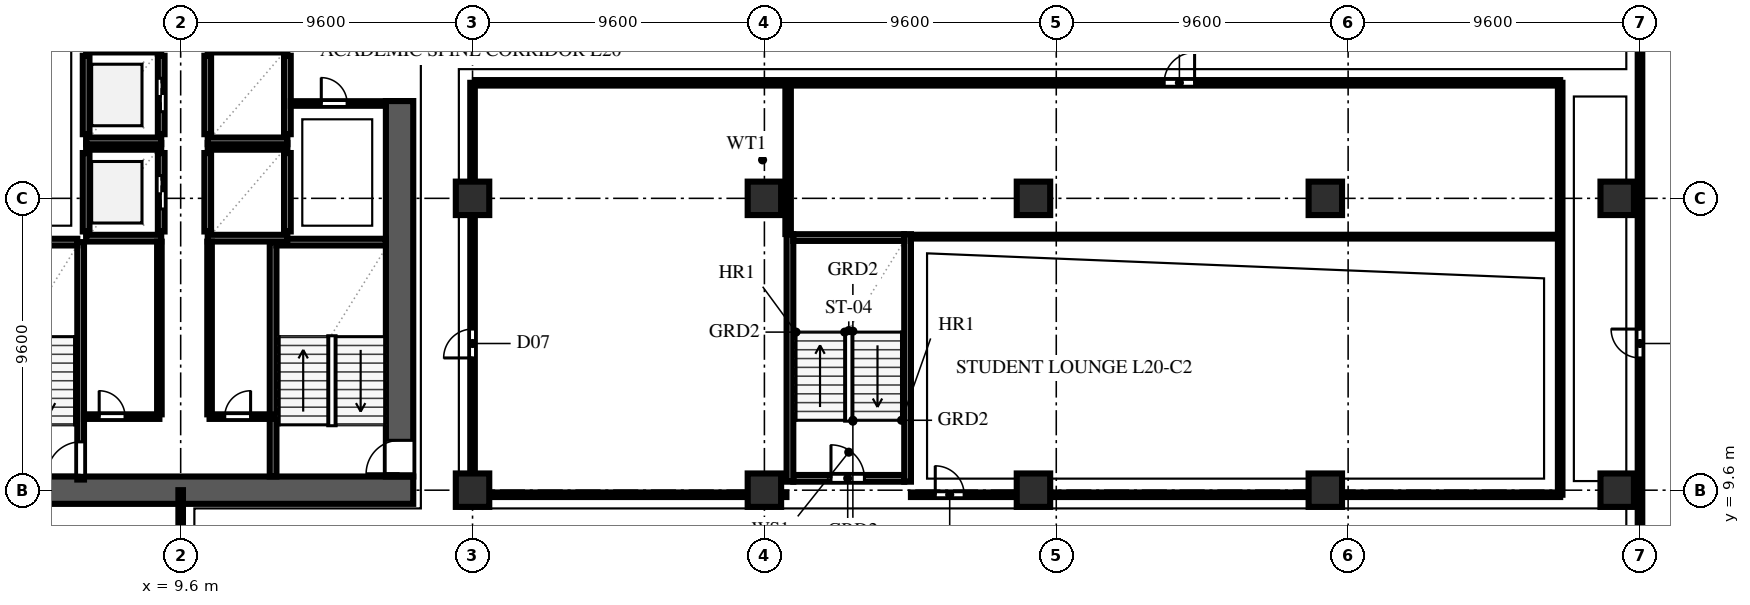
"""IFC4 building model, lengths in metres.
Left out: names, types, materials, properties, quantities, classifications, styles, units other than length and angle.
Written with IfcOpenShell. Run it as: python <this file> out.ifc"""

import sys

from ifc_helpers import new_model, si_unit, direction, frame, frame_2d, origin, origin_2d, place, context, subcontext, project, spatial, rectangle, extrude, element, fill, save


model = new_model("IFC4")
c1 = context("Model", 3, precision=1e-05, world=origin(), true_north=direction((0.0, 1.0)))
c2 = subcontext(c1, "Body", "Model", "MODEL_VIEW")
j1 = project(units=[si_unit("LENGTHUNIT", "METRE"), si_unit("PLANEANGLEUNIT", "RADIAN")], contexts=[c1])
p1 = place(None, origin())
s1 = spatial("IfcSite", under=j1, at=p1, CompositionType="ELEMENT")
p2 = place(p1, origin())
s2 = spatial("IfcBuilding", under=s1, at=p2, CompositionType="ELEMENT")
p3 = place(p2, frame((0.0, 0.0, 81.2)))
s3 = spatial("IfcBuildingStorey", under=s2, at=p3, CompositionType="ELEMENT", Elevation=81.2)
p4 = place(p3, frame((2.65, 9.6, 0.0), z_axis=(0.0, 0.0, 1.0), x_axis=(1.0, 0.0, 0.0)))
e1 = element("IfcWall", 1, at=p4, inside=s3, PredefinedType="SHEAR", context=c2, shape_type="SweptSolid", body=[
    extrude(rectangle(XDim=14.6, YDim=0.9, at=frame_2d((7.3, 0.0))), origin(), (0.0, 0.0, 1.0), 3.54),
])
p5 = place(p3, frame((16.8, 10.05, 0.0), z_axis=(0.0, 0.0, 1.0), x_axis=(0.0, 1.0, 0.0)))
e2 = element("IfcWall", 2, at=p5, inside=s3, PredefinedType="SHEAR", context=c2, shape_type="SweptSolid", body=[
    extrude(rectangle(XDim=12.35, YDim=0.9, at=frame_2d((6.175, 0.0))), origin(), (0.0, 0.0, 1.0), 3.54),
])
p6 = place(p5, frame((0.09, 0.0, 0.0)))
e3 = element("IfcOpeningElement", 3, at=p6, cuts=e2, PredefinedType="OPENING", context=c2, shape_type="SweptSolid", body=[
    extrude(rectangle(XDim=1.1, YDim=2.2, at=frame_2d((0.55, 1.1))), frame((0.0, 0.462, 0.0), z_axis=(0.0, -1.0, 0.0), x_axis=(1.0, 0.0, 0.0)), (0.0, 0.0, 1.0), 0.924),
])
for number, where, z_axis, x_axis in (
    (4, (19.2, 9.6, 0.0), (0.0, 0.0, 1.0), (1.0, 0.0, 0.0)),
    (5, (19.2, 19.2, 0.0), (0.0, 0.0, 1.0), (1.0, 0.0, 0.0)),
    (6, (28.8, 9.6, 0.0), (0.0, 0.0, 1.0), (1.0, 0.0, 0.0)),
    (7, (28.8, 19.2, 0.0), (0.0, 0.0, 1.0), (1.0, 0.0, 0.0)),
    (8, (37.65, 9.6, 0.0), (0.0, 0.0, 1.0), (1.0, 0.0, 0.0)),
    (9, (37.65, 19.2, 0.0), (0.0, 0.0, 1.0), (1.0, 0.0, 0.0)),
    (10, (47.25, 9.6, 0.0), (0.0, 0.0, 1.0), (1.0, 0.0, 0.0)),
    (11, (47.25, 19.2, 0.0), (0.0, 0.0, 1.0), (1.0, 0.0, 0.0)),
    (12, (56.85, 9.6, 0.0), (0.0, 0.0, 1.0), (1.0, 0.0, 0.0)),
    (13, (56.85, 19.2, 0.0), (0.0, 0.0, 1.0), (1.0, 0.0, 0.0)),
):
    element("IfcColumn", number, at=place(p3, frame(where, z_axis=z_axis, x_axis=x_axis)), inside=s3, PredefinedType="COLUMN", context=c2, shape_type="SweptSolid", body=[
        extrude(rectangle(XDim=1.1, YDim=1.1, at=origin_2d()), origin(), (0.0, 0.0, 1.0), 3.8),
    ])
p7 = place(p3, frame((6.31, 9.95, 0.0), z_axis=(0.0, 0.0, 1.0), x_axis=(0.0, 1.0, 0.0)))
e14 = element("IfcWall", 14, at=p7, inside=s3, PredefinedType="SOLIDWALL", context=c2, shape_type="SweptSolid", body=[
    extrude(rectangle(XDim=7.81, YDim=0.22, at=frame_2d((3.905, 0.0))), origin(), (0.0, 0.0, 1.0), 3.54),
])
p8 = place(p7, frame((0.14, 0.0, 0.0)))
e15 = element("IfcOpeningElement", 15, at=p8, cuts=e14, PredefinedType="OPENING", context=c2, shape_type="SweptSolid", body=[
    extrude(rectangle(XDim=1.1, YDim=2.2, at=frame_2d((0.55, 1.1))), frame((0.0, 0.122, 0.0), z_axis=(0.0, -1.0, 0.0), x_axis=(1.0, 0.0, 0.0)), (0.0, 0.0, 1.0), 0.244),
])
p9 = place(p3, frame((2.65, 17.76, 0.0), z_axis=(0.0, 0.0, 1.0), x_axis=(1.0, 0.0, 0.0)))
e16 = element("IfcWall", 16, at=p9, inside=s3, PredefinedType="SOLIDWALL", context=c2, shape_type="SweptSolid", body=[
    extrude(rectangle(XDim=3.55, YDim=0.22, at=frame_2d((1.775, 0.0))), origin(), (0.0, 0.0, 1.0), 3.54),
])
p10 = place(p3, frame((12.64, 10.05, 0.0), z_axis=(0.0, 0.0, 1.0), x_axis=(0.0, 1.0, 0.0)))
e17 = element("IfcWall", 17, at=p10, inside=s3, PredefinedType="SOLIDWALL", context=c2, shape_type="SweptSolid", body=[
    extrude(rectangle(XDim=7.71, YDim=0.22, at=frame_2d((3.855, 0.0))), origin(), (0.0, 0.0, 1.0), 3.54),
])
p11 = place(p3, frame((12.75, 17.76, 0.0), z_axis=(0.0, 0.0, 1.0), x_axis=(1.0, 0.0, 0.0)))
e18 = element("IfcWall", 18, at=p11, inside=s3, PredefinedType="SOLIDWALL", context=c2, shape_type="SweptSolid", body=[
    extrude(rectangle(XDim=3.6, YDim=0.22, at=frame_2d((1.8, 0.0))), origin(), (0.0, 0.0, 1.0), 3.54),
])
p12 = place(p3, frame((29.75, 9.99, 0.0), z_axis=(0.0, 0.0, 1.0), x_axis=(1.0, 0.0, 0.0)))
e19 = element("IfcWall", 19, at=p12, inside=s3, PredefinedType="SOLIDWALL", context=c2, shape_type="SweptSolid", body=[
    extrude(rectangle(XDim=3.65, YDim=0.22, at=frame_2d((1.825, 0.0))), origin(), (0.0, 0.0, 1.0), 3.54),
])
p13 = place(p12, frame((1.24, 0.0, 0.0)))
e20 = element("IfcOpeningElement", 20, at=p13, cuts=e19, PredefinedType="OPENING", context=c2, shape_type="SweptSolid", body=[
    extrude(rectangle(XDim=1.1, YDim=2.2, at=frame_2d((0.55, 1.1))), frame((0.0, 0.122, 0.0), z_axis=(0.0, -1.0, 0.0), x_axis=(1.0, 0.0, 0.0)), (0.0, 0.0, 1.0), 0.244),
])
for number, where, z_axis, x_axis in (
    (21, (29.64, 9.88, 0.0), (0.0, 0.0, 1.0), (0.0, 1.0, 0.0)),
    (22, (33.51, 9.88, 0.0), (0.0, 0.0, 1.0), (0.0, 1.0, 0.0)),
):
    element("IfcWall", number, at=place(p3, frame(where, z_axis=z_axis, x_axis=x_axis)), inside=s3, PredefinedType="SOLIDWALL", context=c2, shape_type="SweptSolid", body=[
        extrude(rectangle(XDim=8.14, YDim=0.22, at=frame_2d((4.07, 0.0))), origin(), (0.0, 0.0, 1.0), 3.54),
    ])
p14 = place(p3, frame((29.75, 17.91, 0.0), z_axis=(0.0, 0.0, 1.0), x_axis=(1.0, 0.0, 0.0)))
e23 = element("IfcWall", 23, at=p14, inside=s3, PredefinedType="SOLIDWALL", context=c2, shape_type="SweptSolid", body=[
    extrude(rectangle(XDim=3.65, YDim=0.22, at=frame_2d((1.825, 0.0))), origin(), (0.0, 0.0, 1.0), 3.54),
])
p15 = place(p3, frame((6.49, 18.11, 0.0), z_axis=(0.0, 0.0, 1.0), x_axis=(0.0, 1.0, 0.0)))
e24 = element("IfcWall", 24, at=p15, inside=s3, PredefinedType="SOLIDWALL", context=c2, shape_type="SweptSolid", body=[
    extrude(rectangle(XDim=2.58, YDim=0.22, at=frame_2d((1.29, 0.0))), origin(), (0.0, 0.0, 1.0), 3.54),
])
p16 = place(p3, frame((8.96, 18.11, 0.0), z_axis=(0.0, 0.0, 1.0), x_axis=(0.0, 1.0, 0.0)))
e25 = element("IfcWall", 25, at=p16, inside=s3, PredefinedType="SOLIDWALL", context=c2, shape_type="SweptSolid", body=[
    extrude(rectangle(XDim=2.58, YDim=0.22, at=frame_2d((1.29, 0.0))), origin(), (0.0, 0.0, 1.0), 3.54),
])
p17 = place(p16, frame((0.74, 0.0, 0.0)))
e26 = element("IfcOpeningElement", 26, at=p17, cuts=e25, PredefinedType="OPENING", context=c2, shape_type="SweptSolid", body=[
    extrude(rectangle(XDim=1.1, YDim=2.2, at=frame_2d((0.55, 1.1))), frame((0.0, 0.122, 0.0), z_axis=(0.0, -1.0, 0.0), x_axis=(1.0, 0.0, 0.0)), (0.0, 0.0, 1.0), 0.244),
])
for number, where, z_axis, x_axis in (
    (27, (6.49, 17.89, 0.0), (0.0, 0.0, 1.0), (1.0, 0.0, 0.0)),
    (28, (6.49, 20.91, 0.0), (0.0, 0.0, 1.0), (1.0, 0.0, 0.0)),
):
    element("IfcWall", number, at=place(p3, frame(where, z_axis=z_axis, x_axis=x_axis)), inside=s3, PredefinedType="SOLIDWALL", context=c2, shape_type="SweptSolid", body=[
        extrude(rectangle(XDim=2.47, YDim=0.22, at=frame_2d((1.235, 0.0))), origin(), (0.0, 0.0, 1.0), 3.54),
    ])
p18 = place(p3, frame((6.49, 21.31, 0.0), z_axis=(0.0, 0.0, 1.0), x_axis=(0.0, 1.0, 0.0)))
e29 = element("IfcWall", 29, at=p18, inside=s3, PredefinedType="SOLIDWALL", context=c2, shape_type="SweptSolid", body=[
    extrude(rectangle(XDim=2.58, YDim=0.22, at=frame_2d((1.29, 0.0))), origin(), (0.0, 0.0, 1.0), 3.54),
])
p19 = place(p3, frame((8.96, 21.31, 0.0), z_axis=(0.0, 0.0, 1.0), x_axis=(0.0, 1.0, 0.0)))
e30 = element("IfcWall", 30, at=p19, inside=s3, PredefinedType="SOLIDWALL", context=c2, shape_type="SweptSolid", body=[
    extrude(rectangle(XDim=2.58, YDim=0.22, at=frame_2d((1.29, 0.0))), origin(), (0.0, 0.0, 1.0), 3.54),
])
p20 = place(p19, frame((0.74, 0.0, 0.0)))
e31 = element("IfcOpeningElement", 31, at=p20, cuts=e30, PredefinedType="OPENING", context=c2, shape_type="SweptSolid", body=[
    extrude(rectangle(XDim=1.1, YDim=2.2, at=frame_2d((0.55, 1.1))), frame((0.0, 0.122, 0.0), z_axis=(0.0, -1.0, 0.0), x_axis=(1.0, 0.0, 0.0)), (0.0, 0.0, 1.0), 0.244),
])
p21 = place(p3, frame((6.49, 21.09, 0.0), z_axis=(0.0, 0.0, 1.0), x_axis=(1.0, 0.0, 0.0)))
e32 = element("IfcWall", 32, at=p21, inside=s3, PredefinedType="SOLIDWALL", context=c2, shape_type="SweptSolid", body=[
    extrude(rectangle(XDim=2.47, YDim=0.22, at=frame_2d((1.235, 0.0))), origin(), (0.0, 0.0, 1.0), 3.54),
])
for number, where, z_axis, x_axis in (
    (33, (10.49, 18.11, 0.0), (0.0, 0.0, 1.0), (0.0, 1.0, 0.0)),
    (34, (13.11, 18.11, 0.0), (0.0, 0.0, 1.0), (0.0, 1.0, 0.0)),
):
    element("IfcWall", number, at=place(p3, frame(where, z_axis=z_axis, x_axis=x_axis)), inside=s3, PredefinedType="SOLIDWALL", context=c2, shape_type="SweptSolid", body=[
        extrude(rectangle(XDim=2.58, YDim=0.22, at=frame_2d((1.29, 0.0))), origin(), (0.0, 0.0, 1.0), 3.54),
    ])
for number, where, z_axis, x_axis in (
    (35, (10.49, 17.89, 0.0), (0.0, 0.0, 1.0), (1.0, 0.0, 0.0)),
    (36, (10.49, 20.91, 0.0), (0.0, 0.0, 1.0), (1.0, 0.0, 0.0)),
):
    element("IfcWall", number, at=place(p3, frame(where, z_axis=z_axis, x_axis=x_axis)), inside=s3, PredefinedType="SOLIDWALL", context=c2, shape_type="SweptSolid", body=[
        extrude(rectangle(XDim=2.62, YDim=0.22, at=frame_2d((1.31, 0.0))), origin(), (0.0, 0.0, 1.0), 3.54),
    ])
for number, where, z_axis, x_axis in (
    (37, (10.49, 21.31, 0.0), (0.0, 0.0, 1.0), (0.0, 1.0, 0.0)),
    (38, (13.11, 21.31, 0.0), (0.0, 0.0, 1.0), (0.0, 1.0, 0.0)),
):
    element("IfcWall", number, at=place(p3, frame(where, z_axis=z_axis, x_axis=x_axis)), inside=s3, PredefinedType="SOLIDWALL", context=c2, shape_type="SweptSolid", body=[
        extrude(rectangle(XDim=2.58, YDim=0.22, at=frame_2d((1.29, 0.0))), origin(), (0.0, 0.0, 1.0), 3.54),
    ])
p22 = place(p3, frame((10.49, 21.09, 0.0), z_axis=(0.0, 0.0, 1.0), x_axis=(1.0, 0.0, 0.0)))
e39 = element("IfcWall", 39, at=p22, inside=s3, PredefinedType="SOLIDWALL", context=c2, shape_type="SweptSolid", body=[
    extrude(rectangle(XDim=2.62, YDim=0.22, at=frame_2d((1.31, 0.0))), origin(), (0.0, 0.0, 1.0), 3.54),
])
p23 = place(p3, frame((6.42, 12.02, 0.0), z_axis=(0.0, 0.0, 1.0), x_axis=(1.0, 0.0, 0.0)))
e40 = element("IfcWall", 40, at=p23, inside=s3, PredefinedType="PARTITIONING", context=c2, shape_type="SweptSolid", body=[
    extrude(rectangle(XDim=2.48, YDim=0.15, at=frame_2d((1.24, 0.0))), origin(), (0.0, 0.0, 1.0), 3.54),
])
p24 = place(p23, frame((0.5, 0.0, 0.0)))
e41 = element("IfcOpeningElement", 41, at=p24, cuts=e40, PredefinedType="OPENING", context=c2, shape_type="SweptSolid", body=[
    extrude(rectangle(XDim=0.85, YDim=2.1, at=frame_2d((0.425, 1.05))), frame((0.0, 0.087, 0.0), z_axis=(0.0, -1.0, 0.0), x_axis=(1.0, 0.0, 0.0)), (0.0, 0.0, 1.0), 0.174),
])
p25 = place(p3, frame((10.55, 12.02, 0.0), z_axis=(0.0, 0.0, 1.0), x_axis=(1.0, 0.0, 0.0)))
e42 = element("IfcWall", 42, at=p25, inside=s3, PredefinedType="PARTITIONING", context=c2, shape_type="SweptSolid", body=[
    extrude(rectangle(XDim=2.08, YDim=0.15, at=frame_2d((1.04, 0.0))), origin(), (0.0, 0.0, 1.0), 3.54),
])
p26 = place(p25, frame((0.5, 0.0, 0.0)))
e43 = element("IfcOpeningElement", 43, at=p26, cuts=e42, PredefinedType="OPENING", context=c2, shape_type="SweptSolid", body=[
    extrude(rectangle(XDim=0.85, YDim=2.1, at=frame_2d((0.425, 1.05))), frame((0.0, 0.087, 0.0), z_axis=(0.0, -1.0, 0.0), x_axis=(1.0, 0.0, 0.0)), (0.0, 0.0, 1.0), 0.174),
])
for number, where, z_axis, x_axis in (
    (44, (8.9, 12.095, 0.0), (0.0, 0.0, 1.0), (0.0, 1.0, 0.0)),
    (45, (10.55, 12.095, 0.0), (0.0, 0.0, 1.0), (0.0, 1.0, 0.0)),
):
    element("IfcWall", number, at=place(p3, frame(where, z_axis=z_axis, x_axis=x_axis)), inside=s3, PredefinedType="PARTITIONING", context=c2, shape_type="SweptSolid", body=[
        extrude(rectangle(XDim=5.68, YDim=0.15, at=frame_2d((2.84, 0.0))), origin(), (0.0, 0.0, 1.0), 3.54),
    ])
p27 = place(p3, frame((13.225, 22.32, 0.0), z_axis=(0.0, 0.0, 1.0), x_axis=(1.0, 0.0, 0.0)))
e46 = element("IfcWall", 46, at=p27, inside=s3, PredefinedType="PARTITIONING", context=c2, shape_type="SweptSolid", body=[
    extrude(rectangle(XDim=3.12, YDim=0.15, at=frame_2d((1.56, 0.0))), origin(), (0.0, 0.0, 1.0), 3.54),
])
p28 = place(p27, frame((1.0, 0.0, 0.0)))
e47 = element("IfcOpeningElement", 47, at=p28, cuts=e46, PredefinedType="OPENING", context=c2, shape_type="SweptSolid", body=[
    extrude(rectangle(XDim=0.85, YDim=2.1, at=frame_2d((0.425, 1.05))), frame((0.0, 0.087, 0.0), z_axis=(0.0, -1.0, 0.0), x_axis=(1.0, 0.0, 0.0)), (0.0, 0.0, 1.0), 0.174),
])
p29 = place(p3, frame((9.6, 7.4, 0.0), z_axis=(0.0, 0.0, 1.0), x_axis=(0.0, 1.0, 0.0)))
e48 = element("IfcWall", 48, at=p29, inside=s3, PredefinedType="PARTITIONING", context=c2, shape_type="SweptSolid", body=[
    extrude(rectangle(XDim=2.2, YDim=0.15, at=frame_2d((1.1, 0.0))), origin(), (0.0, 0.0, 1.0), 3.071),
])
p30 = place(p3, frame((57.6, 0.22, 0.0), z_axis=(0.0, 0.0, 1.0), x_axis=(0.0, 1.0, 0.0)))
e49 = element("IfcWall", 49, at=p30, inside=s3, PredefinedType="PARTITIONING", context=c2, shape_type="SweptSolid", body=[
    extrude(rectangle(XDim=37.96, YDim=0.15, at=frame_2d((18.98, 0.0))), origin(), (0.0, 0.0, 1.0), 3.54),
])
p31 = place(p30, frame((13.73, 0.0, 0.0)))
e50 = element("IfcOpeningElement", 50, at=p31, cuts=e49, PredefinedType="OPENING", context=c2, shape_type="SweptSolid", body=[
    extrude(rectangle(XDim=0.95, YDim=2.15, at=frame_2d((0.475, 1.075))), frame((0.0, 0.087, 0.0), z_axis=(0.0, -1.0, 0.0), x_axis=(1.0, 0.0, 0.0)), (0.0, 0.0, 1.0), 0.174),
])
p32 = place(p3, frame((19.2, 9.45, 0.0), z_axis=(0.0, 0.0, 1.0), x_axis=(0.0, 1.0, 0.0)))
e51 = element("IfcWall", 51, at=p32, inside=s3, PredefinedType="PARTITIONING", context=c2, shape_type="SweptSolid", body=[
    extrude(rectangle(XDim=13.55, YDim=0.15, at=frame_2d((6.775, 0.0))), origin(), (0.0, 0.0, 1.0), 3.071),
])
p33 = place(p32, frame((4.5, 0.0, 0.0)))
e52 = element("IfcOpeningElement", 52, at=p33, cuts=e51, PredefinedType="OPENING", context=c2, shape_type="SweptSolid", body=[
    extrude(rectangle(XDim=0.95, YDim=2.15, at=frame_2d((0.475, 1.075))), frame((0.0, 0.087, 0.0), z_axis=(0.0, -1.0, 0.0), x_axis=(1.0, 0.0, 0.0)), (0.0, 0.0, 1.0), 0.174),
])
p34 = place(p3, frame((29.58, 18.025, 0.0), z_axis=(0.0, 0.0, 1.0), x_axis=(0.0, 1.0, 0.0)))
e53 = element("IfcWall", 53, at=p34, inside=s3, PredefinedType="PARTITIONING", context=c2, shape_type="SweptSolid", body=[
    extrude(rectangle(XDim=4.88, YDim=0.18, at=frame_2d((2.44, 0.0))), origin(), (0.0, 0.0, 1.0), 3.54),
])
p35 = place(p3, frame((19.28, 23.0, 0.0), z_axis=(0.0, 0.0, 1.0), x_axis=(1.0, 0.0, 0.0)))
e54 = element("IfcWall", 54, at=p35, inside=s3, PredefinedType="PARTITIONING", context=c2, shape_type="SweptSolid", body=[
    extrude(rectangle(XDim=35.695, YDim=0.18, at=frame_2d((17.848, 0.0))), origin(), (0.0, 0.0, 1.0), 3.54),
])
p36 = place(p35, frame((22.67, 0.0, 0.0)))
e55 = element("IfcOpeningElement", 55, at=p36, cuts=e54, PredefinedType="OPENING", context=c2, shape_type="SweptSolid", body=[
    extrude(rectangle(XDim=1.0, YDim=2.2, at=frame_2d((0.5, 1.1))), frame((0.0, 0.102, 0.0), z_axis=(0.0, -1.0, 0.0), x_axis=(1.0, 0.0, 0.0)), (0.0, 0.0, 1.0), 0.204),
])
p37 = place(p3, frame((19.28, 9.45, 0.0), z_axis=(0.0, 0.0, 1.0), x_axis=(1.0, 0.0, 0.0)))
e56 = element("IfcWall", 56, at=p37, inside=s3, PredefinedType="PARTITIONING", context=c2, shape_type="SweptSolid", body=[
    extrude(rectangle(XDim=10.245, YDim=0.15, at=frame_2d((5.123, 0.0))), origin(), (0.0, 0.0, 1.0), 3.54),
])
p38 = place(p3, frame((33.62, 17.94, 0.0), z_axis=(0.0, 0.0, 1.0), x_axis=(1.0, 0.0, 0.0)))
e57 = element("IfcWall", 57, at=p38, inside=s3, PredefinedType="PARTITIONING", context=c2, shape_type="SweptSolid", body=[
    extrude(rectangle(XDim=21.355, YDim=0.125, at=frame_2d((10.677, 0.0))), origin(), (0.0, 0.0, 1.0), 3.54),
])
p39 = place(p3, frame((33.62, 9.45, 0.0), z_axis=(0.0, 0.0, 1.0), x_axis=(1.0, 0.0, 0.0)))
e58 = element("IfcWall", 58, at=p39, inside=s3, PredefinedType="PARTITIONING", context=c2, shape_type="SweptSolid", body=[
    extrude(rectangle(XDim=21.355, YDim=0.15, at=frame_2d((10.677, 0.0))), origin(), (0.0, 0.0, 1.0), 3.54),
])
p40 = place(p39, frame((0.8, 0.0, 0.0)))
e59 = element("IfcOpeningElement", 59, at=p40, cuts=e58, PredefinedType="OPENING", context=c2, shape_type="SweptSolid", body=[
    extrude(rectangle(XDim=0.95, YDim=2.15, at=frame_2d((0.475, 1.075))), frame((0.0, 0.087, 0.0), z_axis=(0.0, -1.0, 0.0), x_axis=(1.0, 0.0, 0.0)), (0.0, 0.0, 1.0), 0.174),
])
p41 = place(p3, frame((54.975, 9.45, 0.0), z_axis=(0.0, 0.0, 1.0), x_axis=(0.0, 1.0, 0.0)))
e60 = element("IfcWall", 60, at=p41, inside=s3, PredefinedType="PARTITIONING", context=c2, shape_type="SweptSolid", body=[
    extrude(rectangle(XDim=13.55, YDim=0.15, at=frame_2d((6.775, 0.0))), origin(), (0.0, 0.0, 1.0), 3.54),
])
p42 = place(p8, origin())
e61 = element("IfcDoor", 61, at=p42, inside=s3, OperationType="SINGLE_SWING_LEFT", PredefinedType="DOOR", context=c2, shape_type="SweptSolid", body=[
    extrude(rectangle(XDim=1.1, YDim=2.2, at=frame_2d((0.55, 1.1))), frame((0.0, 0.025, 0.0), z_axis=(0.0, -1.0, 0.0), x_axis=(1.0, 0.0, 0.0)), (0.0, 0.0, 1.0), 0.05),
])
fill(e15, e61)
p43 = place(p6, origin())
e62 = element("IfcDoor", 62, at=p43, inside=s3, OperationType="SINGLE_SWING_LEFT", PredefinedType="DOOR", context=c2, shape_type="SweptSolid", body=[
    extrude(rectangle(XDim=1.1, YDim=2.2, at=frame_2d((0.55, 1.1))), frame((0.0, 0.025, 0.0), z_axis=(0.0, -1.0, 0.0), x_axis=(1.0, 0.0, 0.0)), (0.0, 0.0, 1.0), 0.05),
])
fill(e3, e62)
p44 = place(p13, origin())
e63 = element("IfcDoor", 63, at=p44, inside=s3, OperationType="SINGLE_SWING_LEFT", PredefinedType="DOOR", context=c2, shape_type="SweptSolid", body=[
    extrude(rectangle(XDim=1.1, YDim=2.2, at=frame_2d((0.55, 1.1))), frame((0.0, 0.025, 0.0), z_axis=(0.0, -1.0, 0.0), x_axis=(1.0, 0.0, 0.0)), (0.0, 0.0, 1.0), 0.05),
])
fill(e20, e63)
p45 = place(p17, origin())
e64 = element("IfcDoor", 64, at=p45, inside=s3, OperationType="DOUBLE_DOOR_SLIDING", PredefinedType="DOOR", context=c2, shape_type="SweptSolid", body=[
    extrude(rectangle(XDim=1.1, YDim=2.2, at=frame_2d((0.55, 1.1))), frame((0.0, 0.025, 0.0), z_axis=(0.0, -1.0, 0.0), x_axis=(1.0, 0.0, 0.0)), (0.0, 0.0, 1.0), 0.05),
])
fill(e26, e64)
p46 = place(p20, origin())
e65 = element("IfcDoor", 65, at=p46, inside=s3, OperationType="DOUBLE_DOOR_SLIDING", PredefinedType="DOOR", context=c2, shape_type="SweptSolid", body=[
    extrude(rectangle(XDim=1.1, YDim=2.2, at=frame_2d((0.55, 1.1))), frame((0.0, 0.025, 0.0), z_axis=(0.0, -1.0, 0.0), x_axis=(1.0, 0.0, 0.0)), (0.0, 0.0, 1.0), 0.05),
])
fill(e31, e65)
p47 = place(p24, origin())
e66 = element("IfcDoor", 66, at=p47, inside=s3, OperationType="SINGLE_SWING_LEFT", PredefinedType="DOOR", context=c2, shape_type="SweptSolid", body=[
    extrude(rectangle(XDim=0.85, YDim=2.1, at=frame_2d((0.425, 1.05))), frame((0.0, 0.025, 0.0), z_axis=(0.0, -1.0, 0.0), x_axis=(1.0, 0.0, 0.0)), (0.0, 0.0, 1.0), 0.05),
])
fill(e41, e66)
p48 = place(p26, origin())
e67 = element("IfcDoor", 67, at=p48, inside=s3, OperationType="SINGLE_SWING_RIGHT", PredefinedType="DOOR", context=c2, shape_type="SweptSolid", body=[
    extrude(rectangle(XDim=0.85, YDim=2.1, at=frame_2d((0.425, 1.05))), frame((0.0, 0.025, 0.0), z_axis=(0.0, -1.0, 0.0), x_axis=(1.0, 0.0, 0.0)), (0.0, 0.0, 1.0), 0.05),
])
fill(e43, e67)
p49 = place(p28, origin())
e68 = element("IfcDoor", 68, at=p49, inside=s3, OperationType="SINGLE_SWING_LEFT", PredefinedType="DOOR", context=c2, shape_type="SweptSolid", body=[
    extrude(rectangle(XDim=0.85, YDim=2.1, at=frame_2d((0.425, 1.05))), frame((0.0, 0.025, 0.0), z_axis=(0.0, -1.0, 0.0), x_axis=(1.0, 0.0, 0.0)), (0.0, 0.0, 1.0), 0.05),
])
fill(e47, e68)
p50 = place(p31, origin())
e69 = element("IfcDoor", 69, at=p50, inside=s3, OperationType="SINGLE_SWING_RIGHT", PredefinedType="DOOR", context=c2, shape_type="SweptSolid", body=[
    extrude(rectangle(XDim=0.95, YDim=2.15, at=frame_2d((0.475, 1.075))), frame((0.0, 0.025, 0.0), z_axis=(0.0, -1.0, 0.0), x_axis=(1.0, 0.0, 0.0)), (0.0, 0.0, 1.0), 0.05),
])
fill(e50, e69)
p51 = place(p33, origin())
e70 = element("IfcDoor", 70, at=p51, inside=s3, OperationType="SINGLE_SWING_LEFT", PredefinedType="DOOR", context=c2, shape_type="SweptSolid", body=[
    extrude(rectangle(XDim=0.95, YDim=2.15, at=frame_2d((0.475, 1.075))), frame((0.0, 0.025, 0.0), z_axis=(0.0, -1.0, 0.0), x_axis=(1.0, 0.0, 0.0)), (0.0, 0.0, 1.0), 0.05),
])
fill(e52, e70)
p52 = place(p36, origin())
e71 = element("IfcDoor", 71, at=p52, inside=s3, OperationType="SINGLE_SWING_RIGHT", PredefinedType="DOOR", context=c2, shape_type="SweptSolid", body=[
    extrude(rectangle(XDim=1.0, YDim=2.2, at=frame_2d((0.5, 1.1))), frame((0.0, 0.025, 0.0), z_axis=(0.0, -1.0, 0.0), x_axis=(1.0, 0.0, 0.0)), (0.0, 0.0, 1.0), 0.05),
])
fill(e55, e71)
p53 = place(p40, origin())
e72 = element("IfcDoor", 72, at=p53, inside=s3, OperationType="SINGLE_SWING_LEFT", PredefinedType="DOOR", context=c2, shape_type="SweptSolid", body=[
    extrude(rectangle(XDim=0.95, YDim=2.15, at=frame_2d((0.475, 1.075))), frame((0.0, 0.025, 0.0), z_axis=(0.0, -1.0, 0.0), x_axis=(1.0, 0.0, 0.0)), (0.0, 0.0, 1.0), 0.05),
])
fill(e59, e72)
save(model, sys.argv[1])
